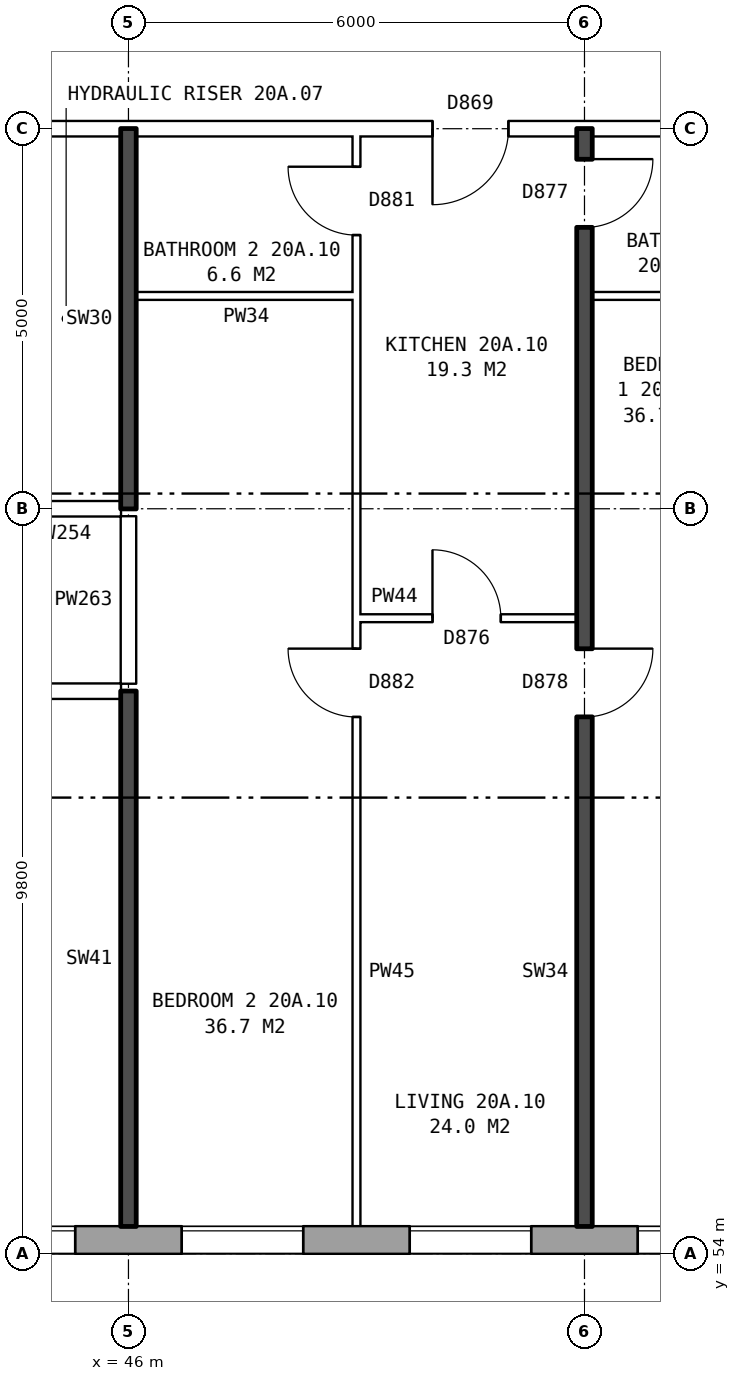
"""IFC4 building model, lengths in metres.
Left out: names, types, materials, properties, quantities, classifications, styles, units other than length and angle.
Written with IfcOpenShell. Run it as: python <this file> out.ifc"""

import sys

from ifc_helpers import new_model, si_unit, direction, frame, frame_2d, origin, place, context, subcontext, project, spatial, rectangle, extrude, element, fill, save


model = new_model("IFC4")
c1 = context("Model", 3, precision=1e-05, world=origin(), true_north=direction((0.0, 1.0)))
c2 = subcontext(c1, "Body", "Model", "MODEL_VIEW")
j1 = project(units=[si_unit("LENGTHUNIT", "METRE"), si_unit("PLANEANGLEUNIT", "RADIAN")], contexts=[c1])
p1 = place(None, origin())
s1 = spatial("IfcSite", under=j1, at=p1, CompositionType="ELEMENT")
p2 = place(p1, origin())
s2 = spatial("IfcBuilding", under=s1, at=p2, CompositionType="ELEMENT")
p3 = place(p2, frame((0.0, 0.0, 74.7)))
s3 = spatial("IfcBuildingStorey", under=s2, at=p3, CompositionType="ELEMENT", Elevation=74.7)
p4 = place(p3, frame((26.325, 54.18, 0.0), z_axis=(0.0, 0.0, 1.0), x_axis=(1.0, 0.0, 0.0)))
e1 = element("IfcWall", 1, at=p4, inside=s3, PredefinedType="STANDARD", context=c2, shape_type="SweptSolid", body=[
    extrude(rectangle(XDim=46.601, YDim=0.36, at=frame_2d((23.3, 0.0))), origin(), (0.0, 0.0, 1.0), 2.85),
])
p5 = place(p4, frame((2.375, 0.0, 0.8)))
e2 = element("IfcOpeningElement", 2, at=p5, cuts=e1, PredefinedType="OPENING", context=c2, shape_type="SweptSolid", body=[
    extrude(rectangle(XDim=1.6, YDim=1.8, at=frame_2d((0.8, 0.9))), frame((0.0, 0.19, 0.0), z_axis=(0.0, -1.0, 0.0), x_axis=(1.0, 0.0, 0.0)), (0.0, 0.0, 1.0), 0.38),
])
p6 = place(p4, frame((4.275, 0.0, 0.8)))
e3 = element("IfcOpeningElement", 3, at=p6, cuts=e1, PredefinedType="OPENING", context=c2, shape_type="SweptSolid", body=[
    extrude(rectangle(XDim=1.6, YDim=1.8, at=frame_2d((0.8, 0.9))), frame((0.0, 0.19, 0.0), z_axis=(0.0, -1.0, 0.0), x_axis=(1.0, 0.0, 0.0)), (0.0, 0.0, 1.0), 0.38),
])
p7 = place(p4, frame((8.275, 0.0, 0.8)))
e4 = element("IfcOpeningElement", 4, at=p7, cuts=e1, PredefinedType="OPENING", context=c2, shape_type="SweptSolid", body=[
    extrude(rectangle(XDim=0.8, YDim=0.9, at=frame_2d((0.4, 0.45))), frame((0.0, 0.19, 0.0), z_axis=(0.0, -1.0, 0.0), x_axis=(1.0, 0.0, 0.0)), (0.0, 0.0, 1.0), 0.38),
])
p8 = place(p4, frame((11.375, 0.0, 0.8)))
e5 = element("IfcOpeningElement", 5, at=p8, cuts=e1, PredefinedType="OPENING", context=c2, shape_type="SweptSolid", body=[
    extrude(rectangle(XDim=1.6, YDim=1.8, at=frame_2d((0.8, 0.9))), frame((0.0, 0.19, 0.0), z_axis=(0.0, -1.0, 0.0), x_axis=(1.0, 0.0, 0.0)), (0.0, 0.0, 1.0), 0.38),
])
p9 = place(p4, frame((14.375, 0.0, 0.8)))
e6 = element("IfcOpeningElement", 6, at=p9, cuts=e1, PredefinedType="OPENING", context=c2, shape_type="SweptSolid", body=[
    extrude(rectangle(XDim=1.6, YDim=1.8, at=frame_2d((0.8, 0.9))), frame((0.0, 0.19, 0.0), z_axis=(0.0, -1.0, 0.0), x_axis=(1.0, 0.0, 0.0)), (0.0, 0.0, 1.0), 0.38),
])
p10 = place(p4, frame((17.375, 0.0, 0.8)))
e7 = element("IfcOpeningElement", 7, at=p10, cuts=e1, PredefinedType="OPENING", context=c2, shape_type="SweptSolid", body=[
    extrude(rectangle(XDim=1.6, YDim=1.8, at=frame_2d((0.8, 0.9))), frame((0.0, 0.19, 0.0), z_axis=(0.0, -1.0, 0.0), x_axis=(1.0, 0.0, 0.0)), (0.0, 0.0, 1.0), 0.38),
])
p11 = place(p4, frame((20.375, 0.0, 0.8)))
e8 = element("IfcOpeningElement", 8, at=p11, cuts=e1, PredefinedType="OPENING", context=c2, shape_type="SweptSolid", body=[
    extrude(rectangle(XDim=1.6, YDim=1.8, at=frame_2d((0.8, 0.9))), frame((0.0, 0.19, 0.0), z_axis=(0.0, -1.0, 0.0), x_axis=(1.0, 0.0, 0.0)), (0.0, 0.0, 1.0), 0.38),
])
p12 = place(p4, frame((23.375, 0.0, 0.8)))
e9 = element("IfcOpeningElement", 9, at=p12, cuts=e1, PredefinedType="OPENING", context=c2, shape_type="SweptSolid", body=[
    extrude(rectangle(XDim=1.6, YDim=1.8, at=frame_2d((0.8, 0.9))), frame((0.0, 0.19, 0.0), z_axis=(0.0, -1.0, 0.0), x_axis=(1.0, 0.0, 0.0)), (0.0, 0.0, 1.0), 0.38),
])
p13 = place(p4, frame((26.375, 0.0, 0.8)))
e10 = element("IfcOpeningElement", 10, at=p13, cuts=e1, PredefinedType="OPENING", context=c2, shape_type="SweptSolid", body=[
    extrude(rectangle(XDim=1.6, YDim=1.8, at=frame_2d((0.8, 0.9))), frame((0.0, 0.19, 0.0), z_axis=(0.0, -1.0, 0.0), x_axis=(1.0, 0.0, 0.0)), (0.0, 0.0, 1.0), 0.38),
])
p14 = place(p4, frame((29.375, 0.0, 0.8)))
e11 = element("IfcOpeningElement", 11, at=p14, cuts=e1, PredefinedType="OPENING", context=c2, shape_type="SweptSolid", body=[
    extrude(rectangle(XDim=1.6, YDim=1.8, at=frame_2d((0.8, 0.9))), frame((0.0, 0.19, 0.0), z_axis=(0.0, -1.0, 0.0), x_axis=(1.0, 0.0, 0.0)), (0.0, 0.0, 1.0), 0.38),
])
p15 = place(p4, frame((32.375, 0.0, 0.8)))
e12 = element("IfcOpeningElement", 12, at=p15, cuts=e1, PredefinedType="OPENING", context=c2, shape_type="SweptSolid", body=[
    extrude(rectangle(XDim=1.6, YDim=1.8, at=frame_2d((0.8, 0.9))), frame((0.0, 0.19, 0.0), z_axis=(0.0, -1.0, 0.0), x_axis=(1.0, 0.0, 0.0)), (0.0, 0.0, 1.0), 0.38),
])
p16 = place(p4, frame((35.375, 0.0, 0.8)))
e13 = element("IfcOpeningElement", 13, at=p16, cuts=e1, PredefinedType="OPENING", context=c2, shape_type="SweptSolid", body=[
    extrude(rectangle(XDim=1.6, YDim=1.8, at=frame_2d((0.8, 0.9))), frame((0.0, 0.19, 0.0), z_axis=(0.0, -1.0, 0.0), x_axis=(1.0, 0.0, 0.0)), (0.0, 0.0, 1.0), 0.38),
])
p17 = place(p4, frame((39.625, 0.0, 1.7)))
e14 = element("IfcOpeningElement", 14, at=p17, cuts=e1, PredefinedType="OPENING", context=c2, shape_type="SweptSolid", body=[
    extrude(rectangle(XDim=1.4, YDim=0.9, at=frame_2d((0.7, 0.45))), frame((0.0, 0.19, 0.0), z_axis=(0.0, -1.0, 0.0), x_axis=(1.0, 0.0, 0.0)), (0.0, 0.0, 1.0), 0.38),
])
p18 = place(p4, frame((41.375, 0.0, 0.8)))
e15 = element("IfcOpeningElement", 15, at=p18, cuts=e1, PredefinedType="OPENING", context=c2, shape_type="SweptSolid", body=[
    extrude(rectangle(XDim=1.6, YDim=1.8, at=frame_2d((0.8, 0.9))), frame((0.0, 0.19, 0.0), z_axis=(0.0, -1.0, 0.0), x_axis=(1.0, 0.0, 0.0)), (0.0, 0.0, 1.0), 0.38),
])
p19 = place(p4, frame((44.375, 0.0, 0.8)))
e16 = element("IfcOpeningElement", 16, at=p19, cuts=e1, PredefinedType="OPENING", context=c2, shape_type="SweptSolid", body=[
    extrude(rectangle(XDim=1.6, YDim=1.8, at=frame_2d((0.8, 0.9))), frame((0.0, 0.19, 0.0), z_axis=(0.0, -1.0, 0.0), x_axis=(1.0, 0.0, 0.0)), (0.0, 0.0, 1.0), 0.38),
])
p20 = place(p4, frame((6.175, 0.0, 1.7)))
e17 = element("IfcOpeningElement", 17, at=p20, cuts=e1, PredefinedType="OPENING", context=c2, shape_type="SweptSolid", body=[
    extrude(rectangle(XDim=0.8, YDim=0.9, at=frame_2d((0.4, 0.45))), frame((0.0, 0.19, 0.0), z_axis=(0.0, -1.0, 0.0), x_axis=(1.0, 0.0, 0.0)), (0.0, 0.0, 1.0), 0.38),
])
p21 = place(p4, frame((9.375, 0.0, 0.8)))
e18 = element("IfcOpeningElement", 18, at=p21, cuts=e1, PredefinedType="OPENING", context=c2, shape_type="SweptSolid", body=[
    extrude(rectangle(XDim=1.0, YDim=1.8, at=frame_2d((0.5, 0.9))), frame((0.0, 0.19, 0.0), z_axis=(0.0, -1.0, 0.0), x_axis=(1.0, 0.0, 0.0)), (0.0, 0.0, 1.0), 0.38),
])
p22 = place(p3, frame((23.61, 61.4, 0.0), z_axis=(0.0, 0.0, 1.0), x_axis=(1.0, 0.0, 0.0)))
e19 = element("IfcWall", 19, at=p22, inside=s3, PredefinedType="PARTITIONING", context=c2, shape_type="SweptSolid", body=[
    extrude(rectangle(XDim=22.29, YDim=0.2, at=frame_2d((11.145, 0.0))), origin(), (0.0, 0.0, 1.0), 2.85),
])
p23 = place(p22, frame((18.84, 0.0, 0.0)))
e20 = element("IfcOpeningElement", 20, at=p23, cuts=e19, PredefinedType="OPENING", context=c2, shape_type="SweptSolid", body=[
    extrude(rectangle(XDim=1.0, YDim=2.1, at=frame_2d((0.5, 1.05))), frame((0.0, 0.11, 0.0), z_axis=(0.0, -1.0, 0.0), x_axis=(1.0, 0.0, 0.0)), (0.0, 0.0, 1.0), 0.22),
])
p24 = place(p22, frame((6.89, 0.0, 0.0)))
e21 = element("IfcOpeningElement", 21, at=p24, cuts=e19, PredefinedType="OPENING", context=c2, shape_type="SweptSolid", body=[
    extrude(rectangle(XDim=1.0, YDim=2.1, at=frame_2d((0.5, 1.05))), frame((0.0, 0.11, 0.0), z_axis=(0.0, -1.0, 0.0), x_axis=(1.0, 0.0, 0.0)), (0.0, 0.0, 1.0), 0.22),
])
p25 = place(p3, frame((49.0, 62.36, 0.0), z_axis=(0.0, 0.0, 1.0), x_axis=(1.0, 0.0, 0.0)))
e22 = element("IfcWall", 22, at=p25, inside=s3, PredefinedType="PARTITIONING", context=c2, shape_type="SweptSolid", body=[
    extrude(rectangle(XDim=2.9, YDim=0.1, at=frame_2d((1.45, 0.0))), origin(), (0.0, 0.0, 1.0), 2.85),
])
p26 = place(p25, frame((1.0, 0.0, 0.0)))
e23 = element("IfcOpeningElement", 23, at=p26, cuts=e22, PredefinedType="OPENING", context=c2, shape_type="SweptSolid", body=[
    extrude(rectangle(XDim=0.9, YDim=2.1, at=frame_2d((0.45, 1.05))), frame((0.0, 0.06, 0.0), z_axis=(0.0, -1.0, 0.0), x_axis=(1.0, 0.0, 0.0)), (0.0, 0.0, 1.0), 0.12),
])
p27 = place(p3, frame((44.36, 63.8, 0.0), z_axis=(0.0, 0.0, 1.0), x_axis=(1.0, 0.0, 0.0)))
e24 = element("IfcWall", 24, at=p27, inside=s3, PredefinedType="PARTITIONING", context=c2, shape_type="SweptSolid", body=[
    extrude(rectangle(XDim=1.54, YDim=0.2, at=frame_2d((0.77, 0.0))), origin(), (0.0, 0.0, 1.0), 2.85),
])
p28 = place(p3, frame((46.1, 66.6, 0.0), z_axis=(0.0, 0.0, 1.0), x_axis=(1.0, 0.0, 0.0)))
e25 = element("IfcWall", 25, at=p28, inside=s3, PredefinedType="PARTITIONING", context=c2, shape_type="SweptSolid", body=[
    extrude(rectangle(XDim=2.9, YDim=0.1, at=frame_2d((1.45, 0.0))), origin(), (0.0, 0.0, 1.0), 2.85),
])
p29 = place(p3, frame((52.1, 66.6, 0.0), z_axis=(0.0, 0.0, 1.0), x_axis=(1.0, 0.0, 0.0)))
e26 = element("IfcWall", 26, at=p29, inside=s3, PredefinedType="PARTITIONING", context=c2, shape_type="SweptSolid", body=[
    extrude(rectangle(XDim=2.8, YDim=0.1, at=frame_2d((1.4, 0.0))), origin(), (0.0, 0.0, 1.0), 2.85),
])
p30 = place(p3, frame((44.36, 68.8, 0.0), z_axis=(0.0, 0.0, 1.0), x_axis=(1.0, 0.0, 0.0)))
e27 = element("IfcWall", 27, at=p30, inside=s3, PredefinedType="PARTITIONING", context=c2, shape_type="SweptSolid", body=[
    extrude(rectangle(XDim=19.28, YDim=0.2, at=frame_2d((9.64, 0.0))), origin(), (0.0, 0.0, 1.0), 2.85),
])
p31 = place(p30, frame((14.64, 0.0, 0.0)))
e28 = element("IfcOpeningElement", 28, at=p31, cuts=e27, PredefinedType="OPENING", context=c2, shape_type="SweptSolid", body=[
    extrude(rectangle(XDim=1.0, YDim=2.1, at=frame_2d((0.5, 1.05))), frame((0.0, 0.11, 0.0), z_axis=(0.0, -1.0, 0.0), x_axis=(1.0, 0.0, 0.0)), (0.0, 0.0, 1.0), 0.22),
])
p32 = place(p30, frame((5.64, 0.0, 0.0)))
e29 = element("IfcOpeningElement", 29, at=p32, cuts=e27, PredefinedType="OPENING", context=c2, shape_type="SweptSolid", body=[
    extrude(rectangle(XDim=1.0, YDim=2.1, at=frame_2d((0.5, 1.05))), frame((0.0, 0.11, 0.0), z_axis=(0.0, -1.0, 0.0), x_axis=(1.0, 0.0, 0.0)), (0.0, 0.0, 1.0), 0.22),
])
p33 = place(p3, frame((46.0, 54.36, 0.0), z_axis=(0.0, 0.0, 1.0), x_axis=(0.0, 1.0, 0.0)))
e30 = element("IfcWall", 30, at=p33, inside=s3, PredefinedType="SOLIDWALL", context=c2, shape_type="SweptSolid", body=[
    extrude(rectangle(XDim=7.04, YDim=0.2, at=frame_2d((3.52, 0.0))), origin(), (0.0, 0.0, 1.0), 2.85),
])
p34 = place(p3, frame((46.0, 61.5, 0.0), z_axis=(0.0, 0.0, 1.0), x_axis=(0.0, 1.0, 0.0)))
e31 = element("IfcWall", 31, at=p34, inside=s3, PredefinedType="PARTITIONING", context=c2, shape_type="SweptSolid", body=[
    extrude(rectangle(XDim=2.2, YDim=0.2, at=frame_2d((1.1, 0.0))), origin(), (0.0, 0.0, 1.0), 2.85),
])
p35 = place(p3, frame((46.0, 63.8, 0.0), z_axis=(0.0, 0.0, 1.0), x_axis=(0.0, 1.0, 0.0)))
e32 = element("IfcWall", 32, at=p35, inside=s3, PredefinedType="SOLIDWALL", context=c2, shape_type="SweptSolid", body=[
    extrude(rectangle(XDim=5.0, YDim=0.2, at=frame_2d((2.5, 0.0))), origin(), (0.0, 0.0, 1.0), 2.85),
])
p36 = place(p3, frame((49.0, 54.36, 0.0), z_axis=(0.0, 0.0, 1.0), x_axis=(0.0, 1.0, 0.0)))
e33 = element("IfcWall", 33, at=p36, inside=s3, PredefinedType="PARTITIONING", context=c2, shape_type="SweptSolid", body=[
    extrude(rectangle(XDim=14.34, YDim=0.1, at=frame_2d((7.17, 0.0))), origin(), (0.0, 0.0, 1.0), 2.85),
])
p37 = place(p36, frame((6.7, 0.0, 0.0)))
e34 = element("IfcOpeningElement", 34, at=p37, cuts=e33, PredefinedType="OPENING", context=c2, shape_type="SweptSolid", body=[
    extrude(rectangle(XDim=0.9, YDim=2.1, at=frame_2d((0.45, 1.05))), frame((0.0, 0.06, 0.0), z_axis=(0.0, -1.0, 0.0), x_axis=(1.0, 0.0, 0.0)), (0.0, 0.0, 1.0), 0.12),
])
p38 = place(p36, frame((13.04, 0.0, 0.0)))
e35 = element("IfcOpeningElement", 35, at=p38, cuts=e33, PredefinedType="OPENING", context=c2, shape_type="SweptSolid", body=[
    extrude(rectangle(XDim=0.9, YDim=2.1, at=frame_2d((0.45, 1.05))), frame((0.0, 0.06, 0.0), z_axis=(0.0, -1.0, 0.0), x_axis=(1.0, 0.0, 0.0)), (0.0, 0.0, 1.0), 0.12),
])
p39 = place(p3, frame((52.0, 54.36, 0.0), z_axis=(0.0, 0.0, 1.0), x_axis=(0.0, 1.0, 0.0)))
e36 = element("IfcWall", 36, at=p39, inside=s3, PredefinedType="SOLIDWALL", context=c2, shape_type="SweptSolid", body=[
    extrude(rectangle(XDim=14.44, YDim=0.2, at=frame_2d((7.22, 0.0))), origin(), (0.0, 0.0, 1.0), 2.85),
])
p40 = place(p39, frame((6.7, 0.0, 0.0)))
e37 = element("IfcOpeningElement", 37, at=p40, cuts=e36, PredefinedType="OPENING", context=c2, shape_type="SweptSolid", body=[
    extrude(rectangle(XDim=0.9, YDim=2.1, at=frame_2d((0.45, 1.05))), frame((0.0, 0.11, 0.0), z_axis=(0.0, -1.0, 0.0), x_axis=(1.0, 0.0, 0.0)), (0.0, 0.0, 1.0), 0.22),
])
p41 = place(p39, frame((13.14, 0.0, 0.0)))
e38 = element("IfcOpeningElement", 38, at=p41, cuts=e36, PredefinedType="OPENING", context=c2, shape_type="SweptSolid", body=[
    extrude(rectangle(XDim=0.9, YDim=2.1, at=frame_2d((0.45, 1.05))), frame((0.0, 0.11, 0.0), z_axis=(0.0, -1.0, 0.0), x_axis=(1.0, 0.0, 0.0)), (0.0, 0.0, 1.0), 0.22),
])
p42 = place(p10, origin())
e39 = element("IfcWindow", 39, at=p42, inside=s3, PartitioningType="SINGLE_PANEL", PredefinedType="WINDOW", context=c2, shape_type="SweptSolid", body=[
    extrude(rectangle(XDim=1.6, YDim=1.8, at=frame_2d((0.8, 0.9))), frame((0.0, 0.15, 0.0), z_axis=(0.0, -1.0, 0.0), x_axis=(1.0, 0.0, 0.0)), (0.0, 0.0, 1.0), 0.06),
])
fill(e7, e39)
p43 = place(p11, origin())
e40 = element("IfcWindow", 40, at=p43, inside=s3, PartitioningType="SINGLE_PANEL", PredefinedType="WINDOW", context=c2, shape_type="SweptSolid", body=[
    extrude(rectangle(XDim=1.6, YDim=1.8, at=frame_2d((0.8, 0.9))), frame((0.0, 0.15, 0.0), z_axis=(0.0, -1.0, 0.0), x_axis=(1.0, 0.0, 0.0)), (0.0, 0.0, 1.0), 0.06),
])
fill(e8, e40)
p44 = place(p12, origin())
e41 = element("IfcWindow", 41, at=p44, inside=s3, PartitioningType="SINGLE_PANEL", PredefinedType="WINDOW", context=c2, shape_type="SweptSolid", body=[
    extrude(rectangle(XDim=1.6, YDim=1.8, at=frame_2d((0.8, 0.9))), frame((0.0, 0.15, 0.0), z_axis=(0.0, -1.0, 0.0), x_axis=(1.0, 0.0, 0.0)), (0.0, 0.0, 1.0), 0.06),
])
fill(e9, e41)
p45 = place(p13, origin())
e42 = element("IfcWindow", 42, at=p45, inside=s3, PartitioningType="SINGLE_PANEL", PredefinedType="WINDOW", context=c2, shape_type="SweptSolid", body=[
    extrude(rectangle(XDim=1.6, YDim=1.8, at=frame_2d((0.8, 0.9))), frame((0.0, 0.15, 0.0), z_axis=(0.0, -1.0, 0.0), x_axis=(1.0, 0.0, 0.0)), (0.0, 0.0, 1.0), 0.06),
])
fill(e10, e42)
p46 = place(p40, frame((0.9, 0.0, 0.0), z_axis=(0.0, 0.0, 1.0), x_axis=(-1.0, 0.0, 0.0)))
e43 = element("IfcDoor", 43, at=p46, inside=s3, OperationType="SINGLE_SWING_LEFT", PredefinedType="DOOR", context=c2, shape_type="SweptSolid", body=[
    extrude(rectangle(XDim=0.9, YDim=2.1, at=frame_2d((0.45, 1.05))), frame((0.0, 0.025, 0.0), z_axis=(0.0, -1.0, 0.0), x_axis=(1.0, 0.0, 0.0)), (0.0, 0.0, 1.0), 0.05),
])
fill(e37, e43)
p47 = place(p37, origin())
e44 = element("IfcDoor", 44, at=p47, inside=s3, OperationType="SINGLE_SWING_RIGHT", PredefinedType="DOOR", context=c2, shape_type="SweptSolid", body=[
    extrude(rectangle(XDim=0.9, YDim=2.1, at=frame_2d((0.45, 1.05))), frame((0.0, 0.025, 0.0), z_axis=(0.0, -1.0, 0.0), x_axis=(1.0, 0.0, 0.0)), (0.0, 0.0, 1.0), 0.05),
])
fill(e34, e44)
p48 = place(p32, frame((1.0, 0.0, 0.0), z_axis=(0.0, 0.0, 1.0), x_axis=(-1.0, 0.0, 0.0)))
e45 = element("IfcDoor", 45, at=p48, inside=s3, OperationType="SINGLE_SWING_RIGHT", PredefinedType="DOOR", context=c2, shape_type="SweptSolid", body=[
    extrude(rectangle(XDim=1.0, YDim=2.1, at=frame_2d((0.5, 1.05))), frame((0.0, 0.025, 0.0), z_axis=(0.0, -1.0, 0.0), x_axis=(1.0, 0.0, 0.0)), (0.0, 0.0, 1.0), 0.05),
])
fill(e29, e45)
p49 = place(p26, origin())
e46 = element("IfcDoor", 46, at=p49, inside=s3, OperationType="SINGLE_SWING_LEFT", PredefinedType="DOOR", context=c2, shape_type="SweptSolid", body=[
    extrude(rectangle(XDim=0.9, YDim=2.1, at=frame_2d((0.45, 1.05))), frame((0.0, 0.025, 0.0), z_axis=(0.0, -1.0, 0.0), x_axis=(1.0, 0.0, 0.0)), (0.0, 0.0, 1.0), 0.05),
])
fill(e23, e46)
p50 = place(p41, frame((0.9, 0.0, 0.0), z_axis=(0.0, 0.0, 1.0), x_axis=(-1.0, 0.0, 0.0)))
e47 = element("IfcDoor", 47, at=p50, inside=s3, OperationType="SINGLE_SWING_LEFT", PredefinedType="DOOR", context=c2, shape_type="SweptSolid", body=[
    extrude(rectangle(XDim=0.9, YDim=2.1, at=frame_2d((0.45, 1.05))), frame((0.0, 0.025, 0.0), z_axis=(0.0, -1.0, 0.0), x_axis=(1.0, 0.0, 0.0)), (0.0, 0.0, 1.0), 0.05),
])
fill(e38, e47)
p51 = place(p38, origin())
e48 = element("IfcDoor", 48, at=p51, inside=s3, OperationType="SINGLE_SWING_RIGHT", PredefinedType="DOOR", context=c2, shape_type="SweptSolid", body=[
    extrude(rectangle(XDim=0.9, YDim=2.1, at=frame_2d((0.45, 1.05))), frame((0.0, 0.025, 0.0), z_axis=(0.0, -1.0, 0.0), x_axis=(1.0, 0.0, 0.0)), (0.0, 0.0, 1.0), 0.05),
])
fill(e35, e48)
save(model, sys.argv[1])
